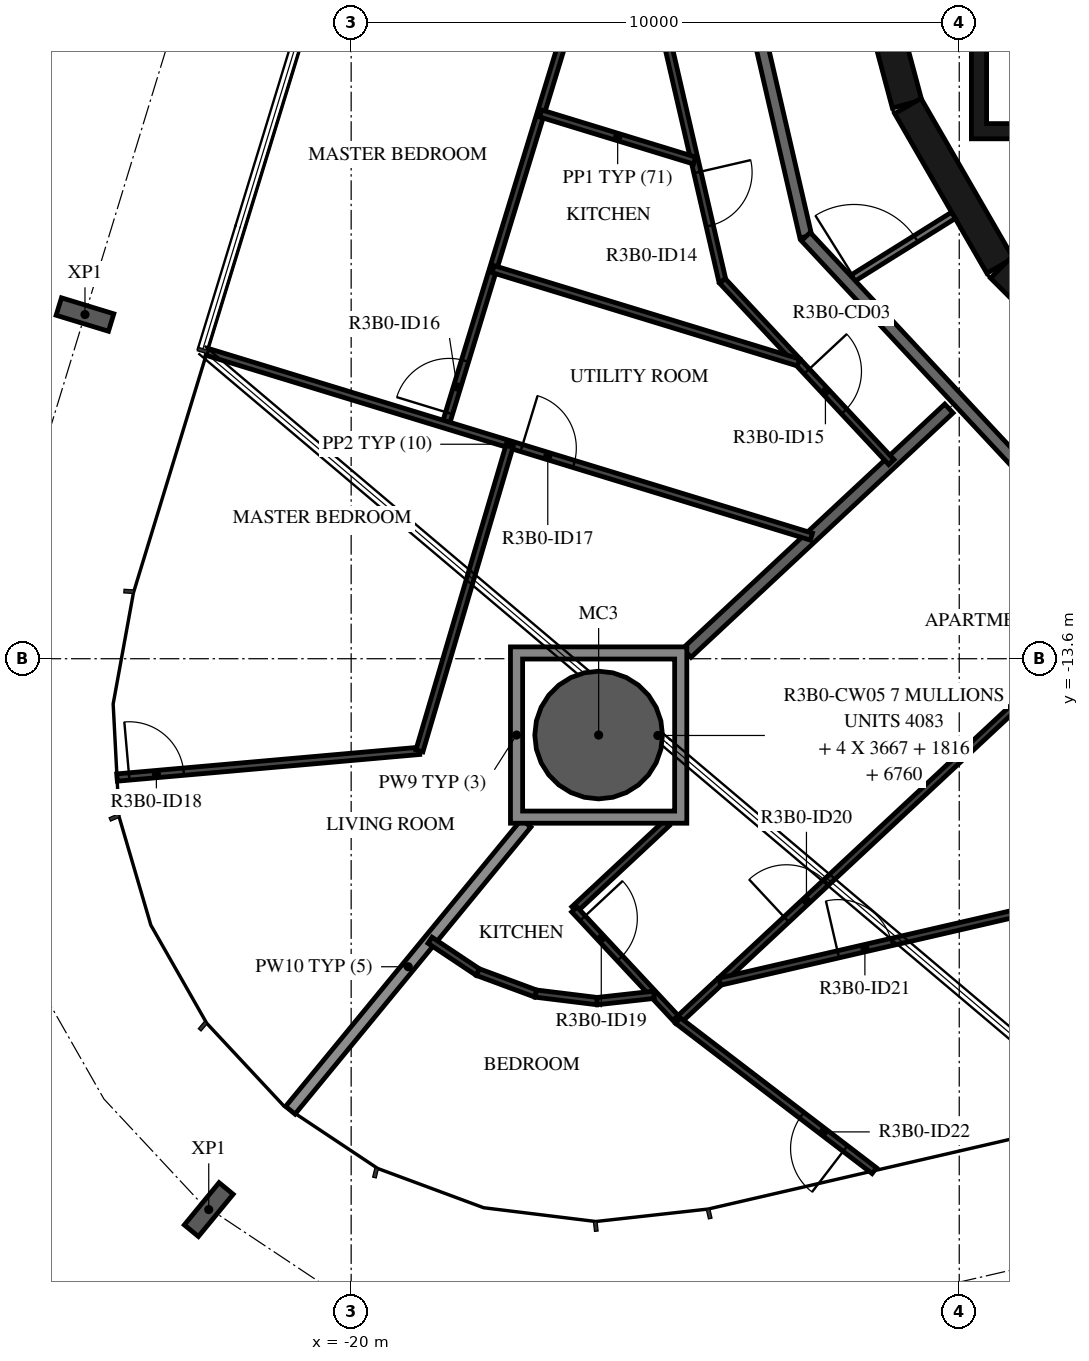
"""IFC4 building model, lengths in metres.
Left out: names, types, materials, properties, quantities, classifications, styles, units other than length and angle.
Written with IfcOpenShell. Run it as: python <this file> out.ifc"""

import sys

from ifc_helpers import new_model, si_unit, direction, frame, frame_2d, origin, origin_2d, place, context, subcontext, project, spatial, polyline, rectangle, hollow_circle, i_section, outline, extrude, element, fill, save


model = new_model("IFC4")
c1 = context("Model", 3, precision=1e-05, world=origin(), true_north=direction((0.0, 1.0)))
c2 = subcontext(c1, "Body", "Model", "MODEL_VIEW")
j1 = project(units=[si_unit("LENGTHUNIT", "METRE"), si_unit("PLANEANGLEUNIT", "RADIAN")], contexts=[c1])
p1 = place(None, origin())
s1 = spatial("IfcSite", under=j1, at=p1, CompositionType="ELEMENT")
p2 = place(p1, origin())
s2 = spatial("IfcBuilding", under=s1, at=p2, CompositionType="ELEMENT")
p3 = place(p2, frame((0.0, 0.0, 127.4)))
s3 = spatial("IfcBuildingStorey", under=s2, at=p3, CompositionType="ELEMENT", Elevation=127.4)
p4 = place(p3, frame((-15.93, -14.855, -0.38), z_axis=(0.0, 0.0, 1.0), x_axis=(1.0, 0.0, 0.0)))
e1 = element("IfcColumn", 1, at=p4, inside=s3, PredefinedType="COLUMN", context=c2, shape_type="SweptSolid", body=[
    extrude(hollow_circle(Radius=1.05, WallThickness=0.05, at=origin_2d()), origin(), (0.0, 0.0, 1.0), 3.5),
])
for number, where, z_axis, x_axis in (
    (2, (-24.377, -7.94, -0.38), (0.0, 0.0, 1.0), (0.292, 0.956, 0.0)),
    (3, (-22.342, -22.659, -0.38), (0.0, 0.0, 1.0), (-0.773, 0.635, 0.0)),
):
    element("IfcColumn", number, at=place(p3, frame(where, z_axis=z_axis, x_axis=x_axis)), inside=s3, PredefinedType="COLUMN", context=c2, shape_type="SweptSolid", body=[
        extrude(i_section(OverallWidth=0.3, OverallDepth=0.9, WebThickness=0.019, FlangeThickness=0.035, FilletRadius=0.03, at=origin_2d()), origin(), (0.0, 0.0, 1.0), 3.5),
    ])
p5 = place(p3, frame((-11.643, -1.55, 0.0), z_axis=(0.0, 0.0, 1.0), x_axis=(0.258734743916, -0.965948410781, 0.0)))
e4 = element("IfcWall", 4, at=p5, inside=s3, PredefinedType="SHEAR", context=c2, shape_type="SweptSolid", body=[
    extrude(rectangle(XDim=3.033, YDim=0.5, at=frame_2d((1.516, 0.0))), origin(), (0.0, 0.0, 1.0), 3.12),
])
p6 = place(p5, frame((1.066, 0.0, 0.0)))
e5 = element("IfcOpeningElement", 5, at=p6, cuts=e4, PredefinedType="OPENING", context=c2, shape_type="SweptSolid", body=[
    extrude(rectangle(XDim=0.9, YDim=2.1, at=frame_2d((0.45, 1.05))), frame((0.0, 0.26, 0.0), z_axis=(0.0, -1.0, 0.0), x_axis=(1.0, 0.0, 0.0)), (0.0, 0.0, 1.0), 0.52),
])
p7 = place(p3, frame((-10.845, -4.51, 0.0), z_axis=(0.0, 0.0, 1.0), x_axis=(0.500087131594, -0.865975092491, 0.0)))
e6 = element("IfcWall", 6, at=p7, inside=s3, PredefinedType="SHEAR", context=c2, shape_type="SweptSolid", body=[
    extrude(rectangle(XDim=3.033, YDim=0.5, at=frame_2d((1.516, 0.0))), origin(), (0.0, 0.0, 1.0), 3.12),
])
p8 = place(p3, frame((-9.308, -7.164, 0.0), z_axis=(0.0, 0.0, 1.0), x_axis=(0.707106781187, -0.707106781187, 0.0)))
e7 = element("IfcWall", 7, at=p8, inside=s3, PredefinedType="SHEAR", context=c2, shape_type="SweptSolid", body=[
    extrude(rectangle(XDim=3.032, YDim=0.5, at=frame_2d((1.516, 0.0))), origin(), (0.0, 0.0, 1.0), 3.12),
])
p9 = place(p3, origin())
e8 = element("IfcWall", 8, at=p9, inside=s3, PredefinedType="SHEAR", context=c2, shape_type="SweptSolid", body=[
    extrude(outline(polyline([(9.8, -5.05), (9.8, -4.8), (9.8, -1.9), (9.55, -1.9), (9.55, -4.8), (7.65, -4.8), (7.65, -1.9), (7.4, -1.9), (7.4, -4.8), (5.5, -4.8), (5.5, -1.9), (5.25, -1.9), (5.25, -4.8), (3.35, -4.8), (3.35, -1.9), (3.1, -1.9), (3.1, -4.8), (1.2, -4.8), (1.2, -1.9), (0.95, -1.9), (0.95, -4.8), (-0.95, -4.8), (-0.95, -1.9), (-1.2, -1.9), (-1.2, -4.8), (-5.25, -4.8), (-5.25, -1.9), (-5.5, -1.9), (-5.5, -4.8), (-7.4, -4.8), (-7.4, -1.9), (-7.65, -1.9), (-7.65, -4.8), (-9.55, -4.8), (-9.55, -1.9), (-9.8, -1.9), (-9.8, -4.8), (-9.8, -5.05), (9.8, -5.05)])), origin(), (0.0, 0.0, 1.0), 3.12),
])
p10 = place(p3, frame((-11.836, -7.396, 0.0), z_axis=(0.0, 0.0, 1.0), x_axis=(0.848071831599, 0.529881277692, 0.0)))
e9 = element("IfcWall", 9, at=p10, inside=s3, PredefinedType="PARTITIONING", context=c2, shape_type="SweptSolid", body=[
    extrude(rectangle(XDim=2.052, YDim=0.12, at=frame_2d((1.026, 0.0))), origin(), (0.0, 0.0, 1.0), 3.12),
])
p11 = place(p10, frame((0.125, 0.0, 0.0)))
e10 = element("IfcOpeningElement", 10, at=p11, cuts=e9, PredefinedType="OPENING", context=c2, shape_type="SweptSolid", body=[
    extrude(rectangle(XDim=1.2, YDim=2.1, at=frame_2d((0.6, 1.05))), frame((0.0, 0.07, 0.0), z_axis=(0.0, -1.0, 0.0), x_axis=(1.0, 0.0, 0.0)), (0.0, 0.0, 1.0), 0.14),
])
p12 = place(p3, frame((-14.175, 0.495, 0.0), z_axis=(0.0, 0.0, 1.0), x_axis=(0.224922649383, -0.974376622151, 0.0)))
e11 = element("IfcWall", 11, at=p12, inside=s3, PredefinedType="STANDARD", context=c2, shape_type="SweptSolid", body=[
    extrude(rectangle(XDim=7.342, YDim=0.2, at=frame_2d((3.671, 0.0))), origin(), (0.0, 0.0, 1.0), 3.12),
])
p13 = place(p3, frame((-12.523, -6.659, 0.0), z_axis=(0.0, 0.0, 1.0), x_axis=(0.682001841105, -0.731350455479, 0.0)))
e12 = element("IfcWall", 12, at=p13, inside=s3, PredefinedType="STANDARD", context=c2, shape_type="SweptSolid", body=[
    extrude(rectangle(XDim=7.342, YDim=0.2, at=frame_2d((3.671, 0.0))), origin(), (0.0, 0.0, 1.0), 3.12),
])
p14 = place(p3, frame((-14.479, -13.504, 0.0), z_axis=(0.0, 0.0, 1.0), x_axis=(0.731329393611, 0.682024426278, 0.0)))
e13 = element("IfcWall", 13, at=p14, inside=s3, PredefinedType="STANDARD", context=c2, shape_type="SweptSolid", body=[
    extrude(rectangle(XDim=5.892, YDim=0.2, at=frame_2d((2.946, 0.0))), origin(), (0.0, 0.0, 1.0), 3.12),
])
p15 = place(p3, frame((-21.0, -21.025, 0.0), z_axis=(0.0, 0.0, 1.0), x_axis=(0.634846795952, 0.772638043116, 0.0)))
e14 = element("IfcWall", 14, at=p15, inside=s3, PredefinedType="STANDARD", context=c2, shape_type="SweptSolid", body=[
    extrude(rectangle(XDim=6.109, YDim=0.2, at=frame_2d((3.055, 0.0))), origin(), (0.0, 0.0, 1.0), 2.73),
])
p16 = place(p3, frame((-15.727, 0.549, 0.0), z_axis=(0.0, 0.0, 1.0), x_axis=(0.22493611855, -0.974373512864, 0.0)))
e15 = element("IfcWall", 15, at=p16, inside=s3, PredefinedType="PARTITIONING", context=c2, shape_type="SweptSolid", body=[
    extrude(rectangle(XDim=8.146, YDim=0.12, at=frame_2d((4.073, 0.0))), origin(), (0.0, 0.0, 1.0), 3.12),
])
p17 = place(p16, frame((3.223, 0.0, 0.0)))
e16 = element("IfcOpeningElement", 16, at=p17, cuts=e15, PredefinedType="OPENING", context=c2, shape_type="SweptSolid", body=[
    extrude(rectangle(XDim=0.8, YDim=2.1, at=frame_2d((0.4, 1.05))), frame((0.0, 0.07, 0.0), z_axis=(0.0, -1.0, 0.0), x_axis=(1.0, 0.0, 0.0)), (0.0, 0.0, 1.0), 0.14),
])
p18 = place(p16, frame((6.314, 0.0, 0.0)))
e17 = element("IfcOpeningElement", 17, at=p18, cuts=e15, PredefinedType="OPENING", context=c2, shape_type="SweptSolid", body=[
    extrude(rectangle(XDim=0.9, YDim=2.1, at=frame_2d((0.45, 1.05))), frame((0.0, 0.07, 0.0), z_axis=(0.0, -1.0, 0.0), x_axis=(1.0, 0.0, 0.0)), (0.0, 0.0, 1.0), 0.14),
])
p19 = place(p3, frame((-13.894, -7.388, 0.0), z_axis=(0.0, 0.0, 1.0), x_axis=(0.681978591143, -0.731372135935, 0.0)))
e18 = element("IfcWall", 18, at=p19, inside=s3, PredefinedType="PARTITIONING", context=c2, shape_type="SweptSolid", body=[
    extrude(rectangle(XDim=4.073, YDim=0.12, at=frame_2d((2.036, 0.0))), origin(), (0.0, 0.0, 1.0), 3.12),
])
p20 = place(p19, frame((2.033, 0.0, 0.0)))
e19 = element("IfcOpeningElement", 19, at=p20, cuts=e18, PredefinedType="OPENING", context=c2, shape_type="SweptSolid", body=[
    extrude(rectangle(XDim=0.9, YDim=2.1, at=frame_2d((0.45, 1.05))), frame((0.0, 0.07, 0.0), z_axis=(0.0, -1.0, 0.0), x_axis=(1.0, 0.0, 0.0)), (0.0, 0.0, 1.0), 0.14),
])
p21 = place(p3, frame((-18.448, -9.752, 0.0), z_axis=(0.0, 0.0, 1.0), x_axis=(0.292365310779, 0.956306710764, 0.0)))
e20 = element("IfcWall", 20, at=p21, inside=s3, PredefinedType="PARTITIONING", context=c2, shape_type="SweptSolid", body=[
    extrude(rectangle(XDim=8.029, YDim=0.12, at=frame_2d((4.015, 0.0))), origin(), (0.0, 0.0, 1.0), 3.12),
])
p22 = place(p21, frame((0.2, 0.0, 0.0)))
e21 = element("IfcOpeningElement", 21, at=p22, cuts=e20, PredefinedType="OPENING", context=c2, shape_type="SweptSolid", body=[
    extrude(rectangle(XDim=0.9, YDim=2.1, at=frame_2d((0.45, 1.05))), frame((0.0, 0.07, 0.0), z_axis=(0.0, -1.0, 0.0), x_axis=(1.0, 0.0, 0.0)), (0.0, 0.0, 1.0), 0.14),
])
p23 = place(p3, frame((-22.369, -8.554, 0.0), z_axis=(0.0, 0.0, 1.0), x_axis=(0.956298667533, -0.292391618339, 0.0)))
e22 = element("IfcWall", 22, at=p23, inside=s3, PredefinedType="PARTITIONING", context=c2, shape_type="SweptSolid", body=[
    extrude(rectangle(XDim=10.392, YDim=0.12, at=frame_2d((5.196, 0.0))), origin(), (0.0, 0.0, 1.0), 2.73),
])
p24 = place(p23, frame((5.408, 0.0, 0.0)))
e23 = element("IfcOpeningElement", 23, at=p24, cuts=e22, PredefinedType="OPENING", context=c2, shape_type="SweptSolid", body=[
    extrude(rectangle(XDim=0.9, YDim=2.1, at=frame_2d((0.45, 1.05))), frame((0.0, 0.07, 0.0), z_axis=(0.0, -1.0, 0.0), x_axis=(1.0, 0.0, 0.0)), (0.0, 0.0, 1.0), 0.14),
])
p25 = place(p3, frame((-16.883, -4.634, 0.0), z_axis=(0.0, 0.0, 1.0), x_axis=(0.956297869455, -0.292394228526, 0.0)))
e24 = element("IfcWall", 24, at=p25, inside=s3, PredefinedType="PARTITIONING", context=c2, shape_type="SweptSolid", body=[
    extrude(rectangle(XDim=2.648, YDim=0.12, at=frame_2d((1.324, 0.0))), origin(), (0.0, 0.0, 1.0), 3.12),
])
p26 = place(p3, frame((-17.666, -7.193, 0.0), z_axis=(0.0, 0.0, 1.0), x_axis=(0.956299223218, -0.292389800905, 0.0)))
e25 = element("IfcWall", 25, at=p26, inside=s3, PredefinedType="PARTITIONING", context=c2, shape_type="SweptSolid", body=[
    extrude(rectangle(XDim=5.251, YDim=0.12, at=frame_2d((2.625, 0.0))), origin(), (0.0, 0.0, 1.0), 3.12),
])
p27 = place(p3, frame((-23.85, -15.554, 0.0), z_axis=(0.0, 0.0, 1.0), x_axis=(0.996125944733, 0.087938059048, 0.0)))
e26 = element("IfcWall", 26, at=p27, inside=s3, PredefinedType="PARTITIONING", context=c2, shape_type="SweptSolid", body=[
    extrude(rectangle(XDim=4.992, YDim=0.12, at=frame_2d((2.496, 0.0))), origin(), (0.0, 0.0, 1.0), 2.73),
])
p28 = place(p27, frame((0.2, 0.0, 0.0)))
e27 = element("IfcOpeningElement", 27, at=p28, cuts=e26, PredefinedType="OPENING", context=c2, shape_type="SweptSolid", body=[
    extrude(rectangle(XDim=0.9, YDim=2.1, at=frame_2d((0.45, 1.05))), frame((0.0, 0.07, 0.0), z_axis=(0.0, -1.0, 0.0), x_axis=(1.0, 0.0, 0.0)), (0.0, 0.0, 1.0), 0.14),
])
p29 = place(p3, frame((-18.878, -15.115, 0.0), z_axis=(0.0, 0.0, 1.0), x_axis=(0.283491828289, 0.95897465206, 0.0)))
e28 = element("IfcWall", 28, at=p29, inside=s3, PredefinedType="PARTITIONING", context=c2, shape_type="SweptSolid", body=[
    extrude(rectangle(XDim=5.254, YDim=0.12, at=frame_2d((2.627, 0.0))), origin(), (0.0, 0.0, 1.0), 3.12),
])
p30 = place(p3, frame((-14.81, -16.305, 0.0), z_axis=(0.0, 0.0, 1.0), x_axis=(-0.73134426424, -0.682008480272, 0.0)))
e29 = element("IfcWall", 29, at=p30, inside=s3, PredefinedType="PARTITIONING", context=c2, shape_type="SweptSolid", body=[
    extrude(rectangle(XDim=2.078, YDim=0.12, at=frame_2d((1.039, 0.0))), origin(), (0.0, 0.0, 1.0), 3.12),
])
p31 = place(p3, frame((-16.33, -17.723, 0.0), z_axis=(0.0, 0.0, 1.0), x_axis=(0.682018966854, -0.731334484933, 0.0)))
e30 = element("IfcWall", 30, at=p31, inside=s3, PredefinedType="PARTITIONING", context=c2, shape_type="SweptSolid", body=[
    extrude(rectangle(XDim=2.5, YDim=0.12, at=frame_2d((1.25, 0.0))), origin(), (0.0, 0.0, 1.0), 3.12),
])
p32 = place(p31, frame((0.2, 0.0, 0.0)))
e31 = element("IfcOpeningElement", 31, at=p32, cuts=e30, PredefinedType="OPENING", context=c2, shape_type="SweptSolid", body=[
    extrude(rectangle(XDim=0.9, YDim=2.1, at=frame_2d((0.45, 1.05))), frame((0.0, 0.07, 0.0), z_axis=(0.0, -1.0, 0.0), x_axis=(1.0, 0.0, 0.0)), (0.0, 0.0, 1.0), 0.14),
])
p33 = place(p3, frame((-14.625, -19.551, 0.0), z_axis=(0.0, 0.0, 1.0), x_axis=(0.731348282704, 0.682004171091, 0.0)))
e32 = element("IfcWall", 32, at=p33, inside=s3, PredefinedType="PARTITIONING", context=c2, shape_type="SweptSolid", body=[
    extrude(rectangle(XDim=8.975, YDim=0.12, at=frame_2d((4.488, 0.0))), origin(), (0.0, 0.0, 1.0), 3.12),
])
p34 = place(p33, frame((2.438, 0.0, 0.0)))
e33 = element("IfcOpeningElement", 33, at=p34, cuts=e32, PredefinedType="OPENING", context=c2, shape_type="SweptSolid", body=[
    extrude(rectangle(XDim=0.9, YDim=2.1, at=frame_2d((0.45, 1.05))), frame((0.0, 0.07, 0.0), z_axis=(0.0, -1.0, 0.0), x_axis=(1.0, 0.0, 0.0)), (0.0, 0.0, 1.0), 0.14),
])
p35 = place(p3, frame((-18.703, -18.23, 0.0), z_axis=(0.0, 0.0, 1.0), x_axis=(0.832328473933, -0.554282699965, 0.0)))
e34 = element("IfcWall", 34, at=p35, inside=s3, PredefinedType="PARTITIONING", context=c2, shape_type="SweptSolid", body=[
    extrude(rectangle(XDim=0.945, YDim=0.12, at=frame_2d((0.472, 0.0))), origin(), (0.0, 0.0, 1.0), 3.12),
])
p36 = place(p3, frame((-17.917, -18.754, 0.0), z_axis=(0.0, 0.0, 1.0), x_axis=(0.937684971769, -0.347486537462, 0.0)))
e35 = element("IfcWall", 35, at=p36, inside=s3, PredefinedType="PARTITIONING", context=c2, shape_type="SweptSolid", body=[
    extrude(rectangle(XDim=1.016, YDim=0.12, at=frame_2d((0.508, 0.0))), origin(), (0.0, 0.0, 1.0), 3.12),
])
p37 = place(p3, frame((-16.964, -19.107, 0.0), z_axis=(0.0, 0.0, 1.0), x_axis=(0.992523553766, -0.122053247474, 0.0)))
e36 = element("IfcWall", 36, at=p37, inside=s3, PredefinedType="PARTITIONING", context=c2, shape_type="SweptSolid", body=[
    extrude(rectangle(XDim=1.016, YDim=0.12, at=frame_2d((0.508, 0.0))), origin(), (0.0, 0.0, 1.0), 3.12),
])
p38 = place(p3, frame((-15.956, -19.231, 0.0), z_axis=(0.0, 0.0, 1.0), x_axis=(0.993867897435, 0.110573968218, 0.0)))
e37 = element("IfcWall", 37, at=p38, inside=s3, PredefinedType="PARTITIONING", context=c2, shape_type="SweptSolid", body=[
    extrude(rectangle(XDim=0.941, YDim=0.12, at=frame_2d((0.47, 0.0))), origin(), (0.0, 0.0, 1.0), 3.12),
])
p39 = place(p3, frame((-11.397, -22.019, 0.0), z_axis=(0.0, 0.0, 1.0), x_axis=(-0.794391941464, 0.60740550157, 0.0)))
e38 = element("IfcWall", 38, at=p39, inside=s3, PredefinedType="PARTITIONING", context=c2, shape_type="SweptSolid", body=[
    extrude(rectangle(XDim=4.063, YDim=0.12, at=frame_2d((2.032, 0.0))), origin(), (0.0, 0.0, 1.0), 3.12),
])
p40 = place(p39, frame((0.6, 0.0, 0.0)))
e39 = element("IfcOpeningElement", 39, at=p40, cuts=e38, PredefinedType="OPENING", context=c2, shape_type="SweptSolid", body=[
    extrude(rectangle(XDim=0.9, YDim=2.1, at=frame_2d((0.45, 1.05))), frame((0.0, 0.07, 0.0), z_axis=(0.0, -1.0, 0.0), x_axis=(1.0, 0.0, 0.0)), (0.0, 0.0, 1.0), 0.14),
])
p41 = place(p3, frame((-13.939, -18.911, 0.0), z_axis=(0.0, 0.0, 1.0), x_axis=(0.974369607456, 0.224953035245, 0.0)))
e40 = element("IfcWall", 40, at=p41, inside=s3, PredefinedType="PARTITIONING", context=c2, shape_type="SweptSolid", body=[
    extrude(rectangle(XDim=33.934, YDim=0.12, at=frame_2d((16.967, 0.0))), origin(), (0.0, 0.0, 1.0), 3.12),
])
p42 = place(p41, frame((2.0, 0.0, 0.0)))
e41 = element("IfcOpeningElement", 41, at=p42, cuts=e40, PredefinedType="OPENING", context=c2, shape_type="SweptSolid", body=[
    extrude(rectangle(XDim=0.9, YDim=2.1, at=frame_2d((0.45, 1.05))), frame((0.0, 0.07, 0.0), z_axis=(0.0, -1.0, 0.0), x_axis=(1.0, 0.0, 0.0)), (0.0, 0.0, 1.0), 0.14),
])
p43 = place(p41, frame((28.154, 0.0, 0.0)))
e42 = element("IfcOpeningElement", 42, at=p43, cuts=e40, PredefinedType="OPENING", context=c2, shape_type="SweptSolid", body=[
    extrude(rectangle(XDim=0.9, YDim=2.1, at=frame_2d((0.45, 1.05))), frame((0.0, 0.07, 0.0), z_axis=(0.0, -1.0, 0.0), x_axis=(1.0, 0.0, 0.0)), (0.0, 0.0, 1.0), 0.14),
])
p44 = place(p41, frame((30.039, 0.0, 0.0)))
e43 = element("IfcOpeningElement", 43, at=p44, cuts=e40, PredefinedType="OPENING", context=c2, shape_type="SweptSolid", body=[
    extrude(rectangle(XDim=0.9, YDim=2.1, at=frame_2d((0.45, 1.05))), frame((0.0, 0.07, 0.0), z_axis=(0.0, -1.0, 0.0), x_axis=(1.0, 0.0, 0.0)), (0.0, 0.0, 1.0), 0.14),
])
p45 = place(p3, origin())
e44 = element("IfcWall", 44, at=p45, inside=s3, PredefinedType="STANDARD", context=c2, shape_type="SweptSolid", body=[
    extrude(outline(polyline([(-14.48, -13.405), (-14.48, -16.305), (-17.38, -16.305), (-17.38, -13.405), (-14.48, -13.405)]), holes=[polyline([(-17.18, -16.105), (-14.68, -16.105), (-14.68, -13.605), (-17.18, -13.605), (-17.18, -16.105)])]), origin(), (0.0, 0.0, 1.0), 3.12),
])
p46 = place(p18, origin())
e45 = element("IfcDoor", 45, at=p46, inside=s3, OperationType="SINGLE_SWING_RIGHT", PredefinedType="DOOR", context=c2, shape_type="SweptSolid", body=[
    extrude(rectangle(XDim=0.9, YDim=2.1, at=frame_2d((0.45, 1.05))), frame((0.0, 0.025, 0.0), z_axis=(0.0, -1.0, 0.0), x_axis=(1.0, 0.0, 0.0)), (0.0, 0.0, 1.0), 0.05),
])
fill(e17, e45)
p47 = place(p20, origin())
e46 = element("IfcDoor", 46, at=p47, inside=s3, OperationType="SINGLE_SWING_RIGHT", PredefinedType="DOOR", context=c2, shape_type="SweptSolid", body=[
    extrude(rectangle(XDim=0.9, YDim=2.1, at=frame_2d((0.45, 1.05))), frame((0.0, 0.025, 0.0), z_axis=(0.0, -1.0, 0.0), x_axis=(1.0, 0.0, 0.0)), (0.0, 0.0, 1.0), 0.05),
])
fill(e19, e46)
p48 = place(p22, origin())
e47 = element("IfcDoor", 47, at=p48, inside=s3, OperationType="SINGLE_SWING_RIGHT", PredefinedType="DOOR", context=c2, shape_type="SweptSolid", body=[
    extrude(rectangle(XDim=0.9, YDim=2.1, at=frame_2d((0.45, 1.05))), frame((0.0, 0.025, 0.0), z_axis=(0.0, -1.0, 0.0), x_axis=(1.0, 0.0, 0.0)), (0.0, 0.0, 1.0), 0.05),
])
fill(e21, e47)
p49 = place(p24, origin())
e48 = element("IfcDoor", 48, at=p49, inside=s3, OperationType="SINGLE_SWING_RIGHT", PredefinedType="DOOR", context=c2, shape_type="SweptSolid", body=[
    extrude(rectangle(XDim=0.9, YDim=2.1, at=frame_2d((0.45, 1.05))), frame((0.0, 0.025, 0.0), z_axis=(0.0, -1.0, 0.0), x_axis=(1.0, 0.0, 0.0)), (0.0, 0.0, 1.0), 0.05),
])
fill(e23, e48)
p50 = place(p28, origin())
e49 = element("IfcDoor", 49, at=p50, inside=s3, OperationType="SINGLE_SWING_LEFT", PredefinedType="DOOR", context=c2, shape_type="SweptSolid", body=[
    extrude(rectangle(XDim=0.9, YDim=2.1, at=frame_2d((0.45, 1.05))), frame((0.0, 0.025, 0.0), z_axis=(0.0, -1.0, 0.0), x_axis=(1.0, 0.0, 0.0)), (0.0, 0.0, 1.0), 0.05),
])
fill(e27, e49)
p51 = place(p32, origin())
e50 = element("IfcDoor", 50, at=p51, inside=s3, OperationType="SINGLE_SWING_LEFT", PredefinedType="DOOR", context=c2, shape_type="SweptSolid", body=[
    extrude(rectangle(XDim=0.9, YDim=2.1, at=frame_2d((0.45, 1.05))), frame((0.0, 0.025, 0.0), z_axis=(0.0, -1.0, 0.0), x_axis=(1.0, 0.0, 0.0)), (0.0, 0.0, 1.0), 0.05),
])
fill(e31, e50)
p52 = place(p34, origin())
e51 = element("IfcDoor", 51, at=p52, inside=s3, OperationType="SINGLE_SWING_LEFT", PredefinedType="DOOR", context=c2, shape_type="SweptSolid", body=[
    extrude(rectangle(XDim=0.9, YDim=2.1, at=frame_2d((0.45, 1.05))), frame((0.0, 0.025, 0.0), z_axis=(0.0, -1.0, 0.0), x_axis=(1.0, 0.0, 0.0)), (0.0, 0.0, 1.0), 0.05),
])
fill(e33, e51)
p53 = place(p42, origin())
e52 = element("IfcDoor", 52, at=p53, inside=s3, OperationType="SINGLE_SWING_LEFT", PredefinedType="DOOR", context=c2, shape_type="SweptSolid", body=[
    extrude(rectangle(XDim=0.9, YDim=2.1, at=frame_2d((0.45, 1.05))), frame((0.0, 0.025, 0.0), z_axis=(0.0, -1.0, 0.0), x_axis=(1.0, 0.0, 0.0)), (0.0, 0.0, 1.0), 0.05),
])
fill(e41, e52)
p54 = place(p40, origin())
e53 = element("IfcDoor", 53, at=p54, inside=s3, OperationType="SINGLE_SWING_LEFT", PredefinedType="DOOR", context=c2, shape_type="SweptSolid", body=[
    extrude(rectangle(XDim=0.9, YDim=2.1, at=frame_2d((0.45, 1.05))), frame((0.0, 0.025, 0.0), z_axis=(0.0, -1.0, 0.0), x_axis=(1.0, 0.0, 0.0)), (0.0, 0.0, 1.0), 0.05),
])
fill(e39, e53)
p55 = place(p11, origin())
e54 = element("IfcDoor", 54, at=p55, inside=s3, OperationType="DOUBLE_DOOR_SINGLE_SWING", PredefinedType="DOOR", context=c2, shape_type="SweptSolid", body=[
    extrude(rectangle(XDim=1.2, YDim=2.1, at=frame_2d((0.6, 1.05))), frame((0.0, 0.025, 0.0), z_axis=(0.0, -1.0, 0.0), x_axis=(1.0, 0.0, 0.0)), (0.0, 0.0, 1.0), 0.05),
])
fill(e10, e54)
save(model, sys.argv[1])
